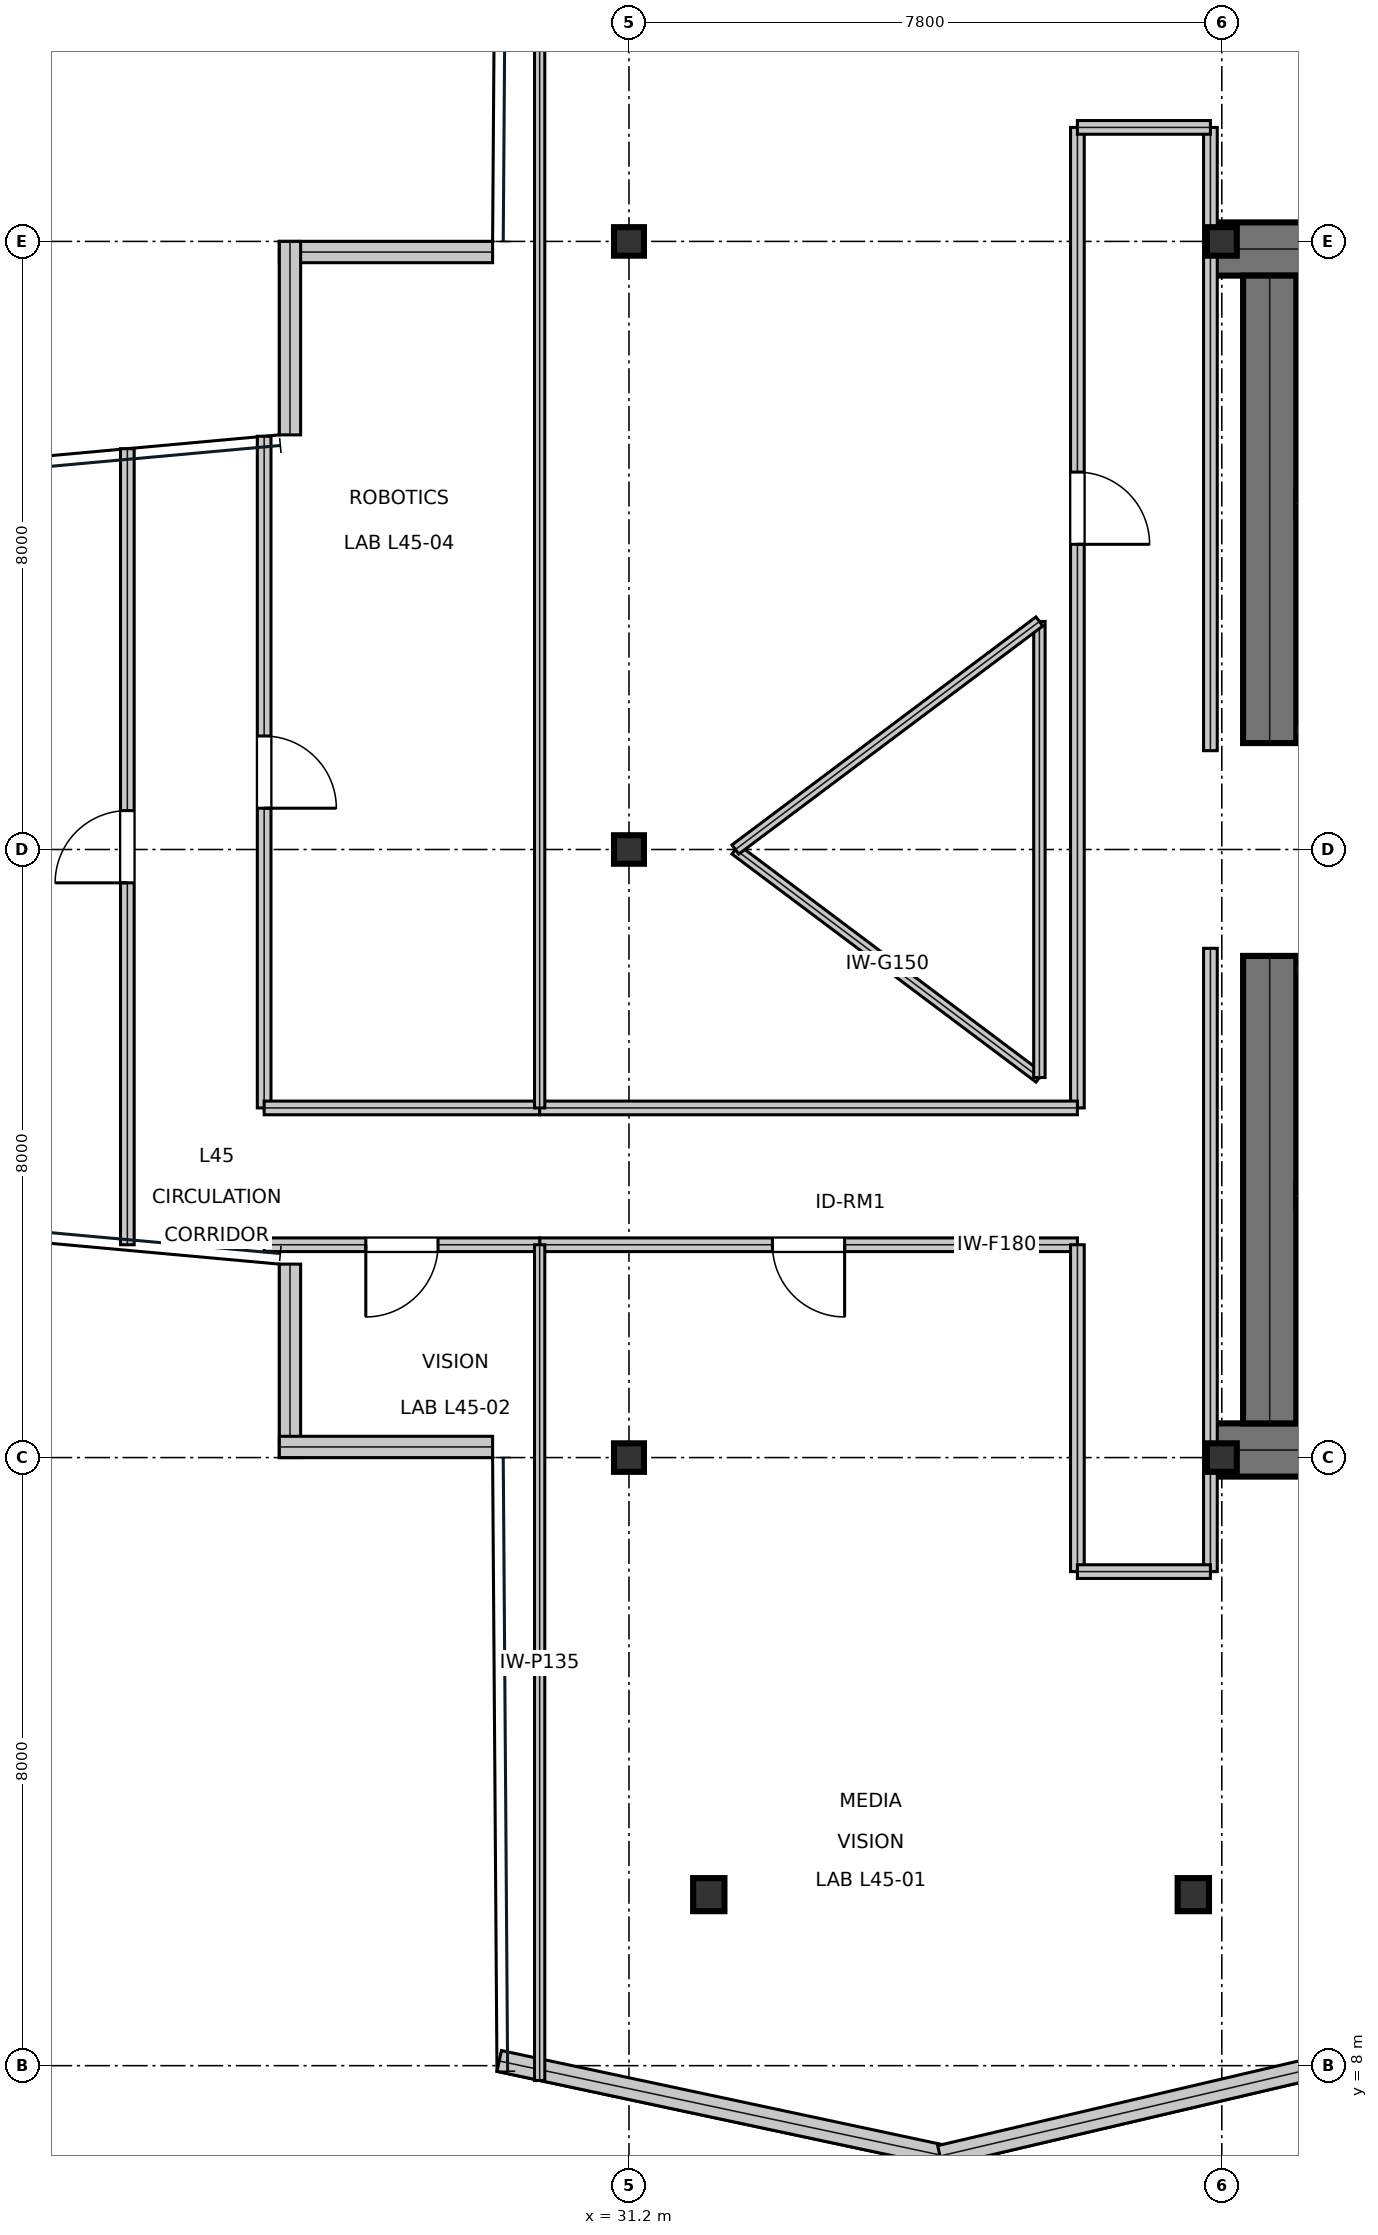
"""IFC4 building model, lengths in metres.
Left out: names, types, materials, properties, quantities, classifications, styles, units other than length and angle.
Written with IfcOpenShell. Run it as: python <this file> out.ifc"""

import sys

from ifc_helpers import new_model, si_unit, direction, frame, frame_2d, origin, origin_2d, place, context, subcontext, project, spatial, rectangle, i_section, extrude, element, fill, save


model = new_model("IFC4")
c1 = context("Model", 3, precision=1e-05, world=origin(), true_north=direction((0.0, 1.0)))
c2 = subcontext(c1, "Body", "Model", "MODEL_VIEW")
j1 = project(units=[si_unit("LENGTHUNIT", "METRE"), si_unit("PLANEANGLEUNIT", "RADIAN")], contexts=[c1])
p1 = place(None, origin())
s1 = spatial("IfcSite", under=j1, at=p1, CompositionType="ELEMENT")
p2 = place(p1, origin())
s2 = spatial("IfcBuilding", under=s1, at=p2, CompositionType="ELEMENT")
p3 = place(p2, frame((0.0, 0.0, 195.9)))
s3 = spatial("IfcBuildingStorey", under=s2, at=p3, CompositionType="ELEMENT", Elevation=195.9)
for number, where, z_axis, x_axis in (
    (1, (38.8, 31.9, 0.0), (0.0, 0.0, 1.0), (1.0, 0.0, 0.0)),
    (2, (38.8, 16.1, 0.0), (0.0, 0.0, 1.0), (1.0, 0.0, 0.0)),
):
    element("IfcWall", number, at=place(p3, frame(where, z_axis=z_axis, x_axis=x_axis)), inside=s3, PredefinedType="SHEAR", context=c2, shape_type="SweptSolid", body=[
        extrude(rectangle(XDim=16.0, YDim=0.7, at=frame_2d((8.0, 0.0))), origin(), (0.0, 0.0, 1.0), 3.79),
    ])
for number, where, z_axis, x_axis in (
    (3, (39.63, 16.45, 0.0), (0.0, 0.0, 1.0), (0.0, 1.0, 0.0)),
    (4, (39.63, 25.4, 0.0), (0.0, 0.0, 1.0), (0.0, 1.0, 0.0)),
):
    element("IfcWall", number, at=place(p3, frame(where, z_axis=z_axis, x_axis=x_axis)), inside=s3, PredefinedType="SHEAR", context=c2, shape_type="SweptSolid", body=[
        extrude(rectangle(XDim=6.15, YDim=0.7, at=frame_2d((3.075, 0.0))), origin(), (0.0, 0.0, 1.0), 3.79),
    ])
p4 = place(p3, frame((39.98, 28.555, 0.0), z_axis=(0.0, 0.0, 1.0), x_axis=(1.0, 0.0, 0.0)))
e5 = element("IfcWall", 5, at=p4, inside=s3, PredefinedType="SHEAR", context=c2, shape_type="SweptSolid", body=[
    extrude(rectangle(XDim=7.71, YDim=0.35, at=frame_2d((3.855, 0.0))), origin(), (0.0, 0.0, 1.0), 3.79),
])
p5 = place(p4, frame((0.25, 0.0, 0.0)))
e6 = element("IfcOpeningElement", 6, at=p5, cuts=e5, PredefinedType="OPENING", context=c2, shape_type="SweptSolid", body=[
    extrude(rectangle(XDim=1.1, YDim=2.15, at=frame_2d((0.55, 1.075))), frame((0.0, 0.185, 0.0), z_axis=(0.0, -1.0, 0.0), x_axis=(1.0, 0.0, 0.0)), (0.0, 0.0, 1.0), 0.37),
])
p6 = place(p3, frame((39.98, 19.445, 0.0), z_axis=(0.0, 0.0, 1.0), x_axis=(1.0, 0.0, 0.0)))
e7 = element("IfcWall", 7, at=p6, inside=s3, PredefinedType="SHEAR", context=c2, shape_type="SweptSolid", body=[
    extrude(rectangle(XDim=7.71, YDim=0.35, at=frame_2d((3.855, 0.0))), origin(), (0.0, 0.0, 1.0), 3.79),
])
p7 = place(p6, frame((0.25, 0.0, 0.0)))
e8 = element("IfcOpeningElement", 8, at=p7, cuts=e7, PredefinedType="OPENING", context=c2, shape_type="SweptSolid", body=[
    extrude(rectangle(XDim=1.1, YDim=2.15, at=frame_2d((0.55, 1.075))), frame((0.0, 0.185, 0.0), z_axis=(0.0, -1.0, 0.0), x_axis=(1.0, 0.0, 0.0)), (0.0, 0.0, 1.0), 0.37),
])
for number, where, z_axis, x_axis in (
    (9, (31.2, 16.0, 0.0), (0.0, 0.0, 1.0), (1.0, 0.0, 0.0)),
    (10, (31.2, 24.0, 0.0), (0.0, 0.0, 1.0), (1.0, 0.0, 0.0)),
    (11, (31.2, 32.0, 0.0), (0.0, 0.0, 1.0), (1.0, 0.0, 0.0)),
    (12, (39.0, 16.0, 0.0), (0.0, 0.0, 1.0), (1.0, 0.0, 0.0)),
    (13, (39.0, 32.0, 0.0), (0.0, 0.0, 1.0), (1.0, 0.0, 0.0)),
):
    element("IfcColumn", number, at=place(p3, frame(where, z_axis=z_axis, x_axis=x_axis)), inside=s3, PredefinedType="COLUMN", context=c2, shape_type="SweptSolid", body=[
        extrude(i_section(OverallWidth=0.394, OverallDepth=0.375, WebThickness=0.017, FlangeThickness=0.028, at=origin_2d()), origin(), (0.0, 0.0, 1.0), 4.044),
    ])
for number, where, z_axis, x_axis in (
    (14, (32.25, 10.25, 0.016), (0.0, 0.0, 1.0), (1.0, 0.0, 0.0)),
    (15, (38.625, 10.25, 0.016), (0.0, 0.0, 1.0), (1.0, 0.0, 0.0)),
):
    element("IfcColumn", number, at=place(p3, frame(where, z_axis=z_axis, x_axis=x_axis)), inside=s3, PredefinedType="COLUMN", context=c2, shape_type="SweptSolid", body=[
        extrude(i_section(OverallWidth=0.412, OverallDepth=0.435, WebThickness=0.036, FlangeThickness=0.058, at=origin_2d()), origin(), (0.0, 0.0, 1.0), 4.018),
    ])
p8 = place(p3, frame((29.406, 31.86, 0.0), z_axis=(0.0, 0.0, 1.0), x_axis=(-1.0, 0.0, 0.0)))
e16 = element("IfcWall", 16, at=p8, inside=s3, PredefinedType="STANDARD", context=c2, shape_type="SweptSolid", body=[
    extrude(rectangle(XDim=2.806, YDim=0.28, at=frame_2d((1.403, 0.0))), origin(), (0.0, 0.0, 1.0), 3.79),
])
for number, where, z_axis, x_axis in (
    (17, (26.74, 32.0, 0.0), (0.0, 0.0, 1.0), (0.0, -1.0, 0.0)),
    (18, (26.74, 18.545, 0.0), (0.0, 0.0, 1.0), (0.0, -1.0, 0.0)),
):
    element("IfcWall", number, at=place(p3, frame(where, z_axis=z_axis, x_axis=x_axis)), inside=s3, PredefinedType="STANDARD", context=c2, shape_type="SweptSolid", body=[
        extrude(rectangle(XDim=2.545, YDim=0.28, at=frame_2d((1.273, 0.0))), origin(), (0.0, 0.0, 1.0), 3.319),
    ])
p9 = place(p3, frame((26.6, 16.14, 0.0), z_axis=(0.0, 0.0, 1.0), x_axis=(1.0, 0.0, 0.0)))
e19 = element("IfcWall", 19, at=p9, inside=s3, PredefinedType="STANDARD", context=c2, shape_type="SweptSolid", body=[
    extrude(rectangle(XDim=2.806, YDim=0.28, at=frame_2d((1.403, 0.0))), origin(), (0.0, 0.0, 1.0), 3.79),
])
p10 = place(p3, frame((29.492, 8.062, 0.0), z_axis=(0.0, 0.0, 1.0), x_axis=(0.978010564176, -0.208555355626, 0.0)))
e20 = element("IfcWall", 20, at=p10, inside=s3, PredefinedType="STANDARD", context=c2, shape_type="SweptSolid", body=[
    extrude(rectangle(XDim=5.994, YDim=0.28, at=frame_2d((2.997, 0.0))), origin(), (0.0, 0.0, 1.0), 3.79),
])
p11 = place(p3, frame((35.293, 6.811, 0.0), z_axis=(0.0, 0.0, 1.0), x_axis=(0.973574347184, 0.228370292517, 0.0)))
e21 = element("IfcWall", 21, at=p11, inside=s3, PredefinedType="STANDARD", context=c2, shape_type="SweptSolid", body=[
    extrude(rectangle(XDim=6.021, YDim=0.28, at=frame_2d((3.01, 0.0))), origin(), (0.0, 0.0, 1.0), 3.79),
])
p12 = place(p3, frame((39.98, 25.575, 0.0), z_axis=(0.0, 0.0, 1.0), x_axis=(1.0, 0.0, 0.0)))
e22 = element("IfcWall", 22, at=p12, inside=s3, PredefinedType="PARTITIONING", context=c2, shape_type="SweptSolid", body=[
    extrude(rectangle(XDim=5.9, YDim=0.15, at=frame_2d((2.95, 0.0))), origin(), (0.0, 0.0, 1.0), 3.79),
])
p13 = place(p12, frame((2.35, 0.0, 0.0)))
e23 = element("IfcOpeningElement", 23, at=p13, cuts=e22, PredefinedType="OPENING", context=c2, shape_type="SweptSolid", body=[
    extrude(rectangle(XDim=1.05, YDim=2.15, at=frame_2d((0.525, 1.075))), frame((0.0, 0.085, 0.0), z_axis=(0.0, -1.0, 0.0), x_axis=(1.0, 0.0, 0.0)), (0.0, 0.0, 1.0), 0.17),
])
p14 = place(p3, frame((39.98, 22.425, 0.0), z_axis=(0.0, 0.0, 1.0), x_axis=(1.0, 0.0, 0.0)))
e24 = element("IfcWall", 24, at=p14, inside=s3, PredefinedType="PARTITIONING", context=c2, shape_type="SweptSolid", body=[
    extrude(rectangle(XDim=5.9, YDim=0.15, at=frame_2d((2.95, 0.0))), origin(), (0.0, 0.0, 1.0), 3.79),
])
p15 = place(p14, frame((2.35, 0.0, 0.0)))
e25 = element("IfcOpeningElement", 25, at=p15, cuts=e24, PredefinedType="OPENING", context=c2, shape_type="SweptSolid", body=[
    extrude(rectangle(XDim=1.05, YDim=2.15, at=frame_2d((0.525, 1.075))), frame((0.0, 0.085, 0.0), z_axis=(0.0, -1.0, 0.0), x_axis=(1.0, 0.0, 0.0)), (0.0, 0.0, 1.0), 0.17),
])
p16 = place(p3, frame((30.025, 18.8, 0.0), z_axis=(0.0, 0.0, 1.0), x_axis=(1.0, 0.0, 0.0)))
e26 = element("IfcWall", 26, at=p16, inside=s3, PredefinedType="SOLIDWALL", context=c2, shape_type="SweptSolid", body=[
    extrude(rectangle(XDim=7.075, YDim=0.18, at=frame_2d((3.538, 0.0))), origin(), (0.0, 0.0, 1.0), 3.241),
])
p17 = place(p16, frame((3.062, 0.0, 0.0)))
e27 = element("IfcOpeningElement", 27, at=p17, cuts=e26, PredefinedType="OPENING", context=c2, shape_type="SweptSolid", body=[
    extrude(rectangle(XDim=0.95, YDim=2.15, at=frame_2d((0.475, 1.075))), frame((0.0, 0.1, 0.0), z_axis=(0.0, -1.0, 0.0), x_axis=(1.0, 0.0, 0.0)), (0.0, 0.0, 1.0), 0.2),
])
p18 = place(p3, frame((26.4, 18.8, 0.0), z_axis=(0.0, 0.0, 1.0), x_axis=(1.0, 0.0, 0.0)))
e28 = element("IfcWall", 28, at=p18, inside=s3, PredefinedType="SOLIDWALL", context=c2, shape_type="SweptSolid", body=[
    extrude(rectangle(XDim=3.625, YDim=0.18, at=frame_2d((1.812, 0.0))), origin(), (0.0, 0.0, 1.0), 3.79),
])
p19 = place(p18, frame((1.337, 0.0, 0.0)))
e29 = element("IfcOpeningElement", 29, at=p19, cuts=e28, PredefinedType="OPENING", context=c2, shape_type="SweptSolid", body=[
    extrude(rectangle(XDim=0.95, YDim=2.15, at=frame_2d((0.475, 1.075))), frame((0.0, 0.1, 0.0), z_axis=(0.0, -1.0, 0.0), x_axis=(1.0, 0.0, 0.0)), (0.0, 0.0, 1.0), 0.2),
])
p20 = place(p3, frame((24.6, 18.8, 0.0), z_axis=(0.0, 0.0, 1.0), x_axis=(0.0, 1.0, 0.0)))
e30 = element("IfcWall", 30, at=p20, inside=s3, PredefinedType="SOLIDWALL", context=c2, shape_type="SweptSolid", body=[
    extrude(rectangle(XDim=10.473, YDim=0.18, at=frame_2d((5.237, 0.0))), origin(), (0.0, 0.0, 1.0), 3.241),
])
p21 = place(p20, frame((4.761, 0.0, 0.0)))
e31 = element("IfcOpeningElement", 31, at=p21, cuts=e30, PredefinedType="OPENING", context=c2, shape_type="SweptSolid", body=[
    extrude(rectangle(XDim=0.95, YDim=2.15, at=frame_2d((0.475, 1.075))), frame((0.0, 0.1, 0.0), z_axis=(0.0, -1.0, 0.0), x_axis=(1.0, 0.0, 0.0)), (0.0, 0.0, 1.0), 0.2),
])
p22 = place(p3, frame((26.4, 20.6, 0.0), z_axis=(0.0, 0.0, 1.0), x_axis=(0.0, 1.0, 0.0)))
e32 = element("IfcWall", 32, at=p22, inside=s3, PredefinedType="SOLIDWALL", context=c2, shape_type="SweptSolid", body=[
    extrude(rectangle(XDim=8.836, YDim=0.18, at=frame_2d((4.418, 0.0))), origin(), (0.0, 0.0, 1.0), 3.241),
])
p23 = place(p22, frame((3.943, 0.0, 0.0)))
e33 = element("IfcOpeningElement", 33, at=p23, cuts=e32, PredefinedType="OPENING", context=c2, shape_type="SweptSolid", body=[
    extrude(rectangle(XDim=0.95, YDim=2.15, at=frame_2d((0.475, 1.075))), frame((0.0, 0.1, 0.0), z_axis=(0.0, -1.0, 0.0), x_axis=(1.0, 0.0, 0.0)), (0.0, 0.0, 1.0), 0.2),
])
p24 = place(p3, frame((37.1, 20.6, 0.0), z_axis=(0.0, 0.0, 1.0), x_axis=(0.0, 1.0, 0.0)))
e34 = element("IfcWall", 34, at=p24, inside=s3, PredefinedType="SOLIDWALL", context=c2, shape_type="SweptSolid", body=[
    extrude(rectangle(XDim=12.9, YDim=0.18, at=frame_2d((6.45, 0.0))), origin(), (0.0, 0.0, 1.0), 3.241),
])
p25 = place(p24, frame((7.415, 0.0, 0.0)))
e35 = element("IfcOpeningElement", 35, at=p25, cuts=e34, PredefinedType="OPENING", context=c2, shape_type="SweptSolid", body=[
    extrude(rectangle(XDim=0.95, YDim=2.15, at=frame_2d((0.475, 1.075))), frame((0.0, 0.1, 0.0), z_axis=(0.0, -1.0, 0.0), x_axis=(1.0, 0.0, 0.0)), (0.0, 0.0, 1.0), 0.2),
])
p26 = place(p3, frame((38.85, 14.5, 0.0), z_axis=(0.0, 0.0, 1.0), x_axis=(0.0, 1.0, 0.0)))
e36 = element("IfcWall", 36, at=p26, inside=s3, PredefinedType="SOLIDWALL", context=c2, shape_type="SweptSolid", body=[
    extrude(rectangle(XDim=8.2, YDim=0.18, at=frame_2d((4.1, 0.0))), origin(), (0.0, 0.0, 1.0), 3.241),
])
p27 = place(p3, frame((37.1, 14.5, 0.0), z_axis=(0.0, 0.0, 1.0), x_axis=(0.0, 1.0, 0.0)))
e37 = element("IfcWall", 37, at=p27, inside=s3, PredefinedType="SOLIDWALL", context=c2, shape_type="SweptSolid", body=[
    extrude(rectangle(XDim=4.3, YDim=0.18, at=frame_2d((2.15, 0.0))), origin(), (0.0, 0.0, 1.0), 3.241),
])
p28 = place(p3, frame((37.1, 14.5, 0.0), z_axis=(0.0, 0.0, 1.0), x_axis=(1.0, 0.0, 0.0)))
e38 = element("IfcWall", 38, at=p28, inside=s3, PredefinedType="SOLIDWALL", context=c2, shape_type="SweptSolid", body=[
    extrude(rectangle(XDim=1.75, YDim=0.18, at=frame_2d((0.875, 0.0))), origin(), (0.0, 0.0, 1.0), 3.241),
])
p29 = place(p3, frame((26.4, 20.6, 0.0), z_axis=(0.0, 0.0, 1.0), x_axis=(1.0, 0.0, 0.0)))
e39 = element("IfcWall", 39, at=p29, inside=s3, PredefinedType="SOLIDWALL", context=c2, shape_type="SweptSolid", body=[
    extrude(rectangle(XDim=3.625, YDim=0.18, at=frame_2d((1.812, 0.0))), origin(), (0.0, 0.0, 1.0), 3.79),
])
p30 = place(p3, frame((38.85, 25.3, 0.0), z_axis=(0.0, 0.0, 1.0), x_axis=(0.0, 1.0, 0.0)))
e40 = element("IfcWall", 40, at=p30, inside=s3, PredefinedType="SOLIDWALL", context=c2, shape_type="SweptSolid", body=[
    extrude(rectangle(XDim=8.2, YDim=0.18, at=frame_2d((4.1, 0.0))), origin(), (0.0, 0.0, 1.0), 3.241),
])
p31 = place(p3, frame((30.025, 20.6, 0.0), z_axis=(0.0, 0.0, 1.0), x_axis=(1.0, 0.0, 0.0)))
e41 = element("IfcWall", 41, at=p31, inside=s3, PredefinedType="SOLIDWALL", context=c2, shape_type="SweptSolid", body=[
    extrude(rectangle(XDim=7.075, YDim=0.18, at=frame_2d((3.538, 0.0))), origin(), (0.0, 0.0, 1.0), 3.241),
])
p32 = place(p3, frame((37.1, 33.5, 0.0), z_axis=(0.0, 0.0, 1.0), x_axis=(1.0, 0.0, 0.0)))
e42 = element("IfcWall", 42, at=p32, inside=s3, PredefinedType="SOLIDWALL", context=c2, shape_type="SweptSolid", body=[
    extrude(rectangle(XDim=1.75, YDim=0.18, at=frame_2d((0.875, 0.0))), origin(), (0.0, 0.0, 1.0), 3.241),
])
p33 = place(p3, frame((30.025, 7.805, 0.0), z_axis=(0.0, 0.0, 1.0), x_axis=(0.0, 1.0, 0.0)))
e43 = element("IfcWall", 43, at=p33, inside=s3, PredefinedType="PARTITIONING", context=c2, shape_type="SweptSolid", body=[
    extrude(rectangle(XDim=10.995, YDim=0.135, at=frame_2d((5.498, 0.0))), origin(), (0.0, 0.0, 1.0), 3.319),
])
p34 = place(p3, frame((30.025, 20.6, 0.0), z_axis=(0.0, 0.0, 1.0), x_axis=(0.0, 1.0, 0.0)))
e44 = element("IfcWall", 44, at=p34, inside=s3, PredefinedType="PARTITIONING", context=c2, shape_type="SweptSolid", body=[
    extrude(rectangle(XDim=19.595, YDim=0.135, at=frame_2d((9.797, 0.0))), origin(), (0.0, 0.0, 1.0), 3.241),
])
p35 = place(p3, frame((32.6, 24.0, 0.0), z_axis=(0.0, 0.0, 1.0), x_axis=(0.8, -0.6, 0.0)))
e45 = element("IfcWall", 45, at=p35, inside=s3, PredefinedType="MOVABLE", context=c2, shape_type="SweptSolid", body=[
    extrude(rectangle(XDim=5.0, YDim=0.15, at=frame_2d((2.5, 0.0))), origin(), (0.0, 0.0, 1.0), 3.79),
])
p36 = place(p3, frame((36.6, 21.0, 0.0), z_axis=(0.0, 0.0, 1.0), x_axis=(0.0, 1.0, 0.0)))
e46 = element("IfcWall", 46, at=p36, inside=s3, PredefinedType="MOVABLE", context=c2, shape_type="SweptSolid", body=[
    extrude(rectangle(XDim=6.0, YDim=0.15, at=frame_2d((3.0, 0.0))), origin(), (0.0, 0.0, 1.0), 3.79),
])
p37 = place(p3, frame((36.6, 27.0, 0.0), z_axis=(0.0, 0.0, 1.0), x_axis=(-0.8, -0.6, 0.0)))
e47 = element("IfcWall", 47, at=p37, inside=s3, PredefinedType="MOVABLE", context=c2, shape_type="SweptSolid", body=[
    extrude(rectangle(XDim=5.0, YDim=0.15, at=frame_2d((2.5, 0.0))), origin(), (0.0, 0.0, 1.0), 3.79),
])
p38 = place(p17, frame((0.95, 0.0, 0.0), z_axis=(0.0, 0.0, 1.0), x_axis=(-1.0, 0.0, 0.0)))
e48 = element("IfcDoor", 48, at=p38, inside=s3, OperationType="SINGLE_SWING_LEFT", PredefinedType="DOOR", context=c2, shape_type="SweptSolid", body=[
    extrude(rectangle(XDim=0.95, YDim=2.15, at=frame_2d((0.475, 1.075))), frame((0.0, 0.025, 0.0), z_axis=(0.0, -1.0, 0.0), x_axis=(1.0, 0.0, 0.0)), (0.0, 0.0, 1.0), 0.05),
])
fill(e27, e48)
p39 = place(p19, frame((0.95, 0.0, 0.0), z_axis=(0.0, 0.0, 1.0), x_axis=(-1.0, 0.0, 0.0)))
e49 = element("IfcDoor", 49, at=p39, inside=s3, OperationType="SINGLE_SWING_RIGHT", PredefinedType="DOOR", context=c2, shape_type="SweptSolid", body=[
    extrude(rectangle(XDim=0.95, YDim=2.15, at=frame_2d((0.475, 1.075))), frame((0.0, 0.025, 0.0), z_axis=(0.0, -1.0, 0.0), x_axis=(1.0, 0.0, 0.0)), (0.0, 0.0, 1.0), 0.05),
])
fill(e29, e49)
p40 = place(p21, origin())
e50 = element("IfcDoor", 50, at=p40, inside=s3, OperationType="SINGLE_SWING_LEFT", PredefinedType="DOOR", context=c2, shape_type="SweptSolid", body=[
    extrude(rectangle(XDim=0.95, YDim=2.15, at=frame_2d((0.475, 1.075))), frame((0.0, 0.025, 0.0), z_axis=(0.0, -1.0, 0.0), x_axis=(1.0, 0.0, 0.0)), (0.0, 0.0, 1.0), 0.05),
])
fill(e31, e50)
p41 = place(p23, frame((0.95, 0.0, 0.0), z_axis=(0.0, 0.0, 1.0), x_axis=(-1.0, 0.0, 0.0)))
e51 = element("IfcDoor", 51, at=p41, inside=s3, OperationType="SINGLE_SWING_RIGHT", PredefinedType="DOOR", context=c2, shape_type="SweptSolid", body=[
    extrude(rectangle(XDim=0.95, YDim=2.15, at=frame_2d((0.475, 1.075))), frame((0.0, 0.025, 0.0), z_axis=(0.0, -1.0, 0.0), x_axis=(1.0, 0.0, 0.0)), (0.0, 0.0, 1.0), 0.05),
])
fill(e33, e51)
p42 = place(p25, frame((0.95, 0.0, 0.0), z_axis=(0.0, 0.0, 1.0), x_axis=(-1.0, 0.0, 0.0)))
e52 = element("IfcDoor", 52, at=p42, inside=s3, OperationType="SINGLE_SWING_RIGHT", PredefinedType="DOOR", context=c2, shape_type="SweptSolid", body=[
    extrude(rectangle(XDim=0.95, YDim=2.15, at=frame_2d((0.475, 1.075))), frame((0.0, 0.025, 0.0), z_axis=(0.0, -1.0, 0.0), x_axis=(1.0, 0.0, 0.0)), (0.0, 0.0, 1.0), 0.05),
])
fill(e35, e52)
save(model, sys.argv[1])
